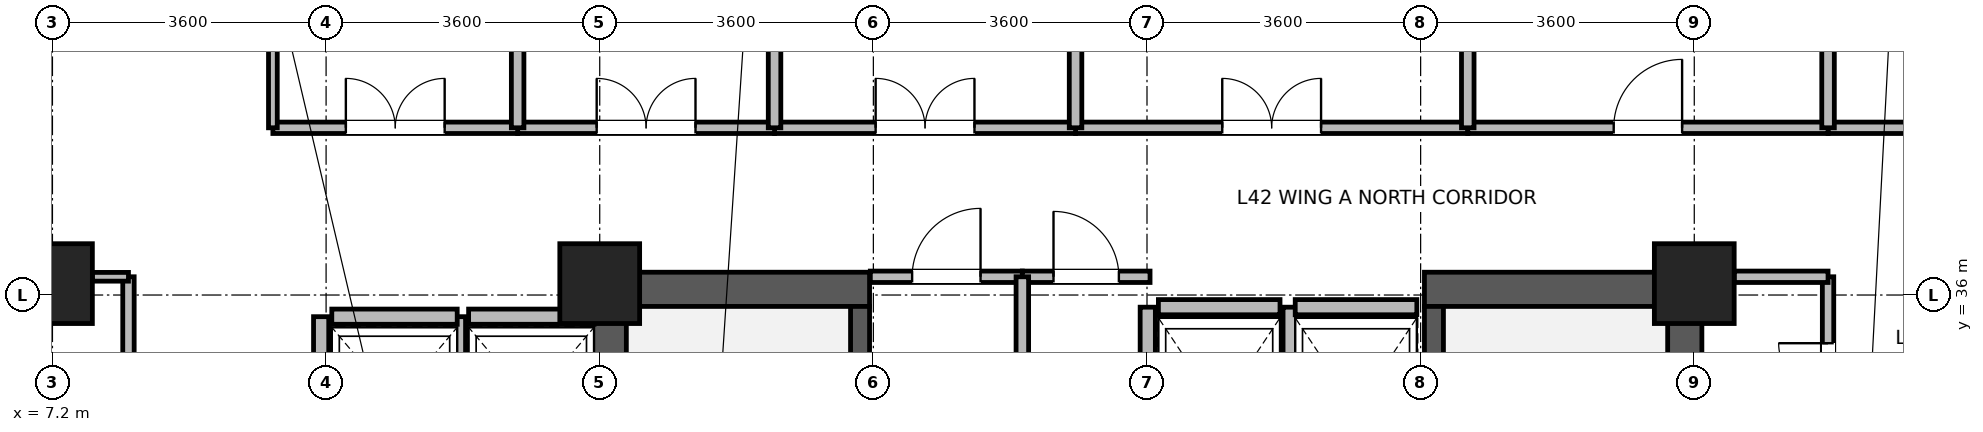
"""IFC4 building model, lengths in metres.
Left out: names, types, materials, properties, quantities, classifications, styles, units other than length and angle.
Written with IfcOpenShell. Run it as: python <this file> out.ifc"""

import sys

from ifc_helpers import new_model, si_unit, direction, frame, frame_2d, origin, origin_2d, place, context, subcontext, project, spatial, rectangle, extrude, source, transform, mapped, element, fill, save


model = new_model("IFC4")
c1 = context("Model", 3, precision=1e-05, world=origin(), true_north=direction((0.0, 1.0)))
c2 = subcontext(c1, "Body", "Model", "MODEL_VIEW")
j1 = project(units=[si_unit("LENGTHUNIT", "METRE"), si_unit("PLANEANGLEUNIT", "RADIAN")], contexts=[c1])
p1 = place(None, origin())
s1 = spatial("IfcSite", under=j1, at=p1, CompositionType="ELEMENT")
p2 = place(p1, origin())
s2 = spatial("IfcBuilding", under=s1, at=p2, CompositionType="ELEMENT")
p3 = place(p2, frame((0.0, 0.0, 166.1)))
s3 = spatial("IfcBuildingStorey", under=s2, at=p3, CompositionType="ELEMENT", Elevation=166.1)
for number, where, z_axis, x_axis in (
    (1, (14.525, 28.4, 0.0), (0.0, 0.0, 1.0), (0.0, 1.0, 0.0)),
    (2, (28.675, 28.4, 0.0), (0.0, 0.0, 1.0), (0.0, 1.0, 0.0)),
):
    element("IfcWall", number, at=place(p3, frame(where, z_axis=z_axis, x_axis=x_axis)), inside=s3, PredefinedType="SHEAR", context=c2, shape_type="SweptSolid", body=[
        extrude(rectangle(XDim=7.9, YDim=0.45, at=frame_2d((3.95, 0.0))), origin(), (0.0, 0.0, 1.0), 3.46),
    ])
for number, where, z_axis, x_axis in (
    (3, (14.75, 36.075, 0.0), (0.0, 0.0, 1.0), (1.0, 0.0, 0.0)),
    (4, (25.25, 36.075, 0.0), (0.0, 0.0, 1.0), (1.0, 0.0, 0.0)),
):
    element("IfcWall", number, at=place(p3, frame(where, z_axis=z_axis, x_axis=x_axis)), inside=s3, PredefinedType="SHEAR", context=c2, shape_type="SweptSolid", body=[
        extrude(rectangle(XDim=3.2, YDim=0.45, at=frame_2d((1.6, 0.0))), origin(), (0.0, 0.0, 1.0), 3.46),
    ])
p4 = place(p3, frame((17.825, 28.85, 0.0), z_axis=(0.0, 0.0, 1.0), x_axis=(0.0, 1.0, 0.0)))
e5 = element("IfcWall", 5, at=p4, inside=s3, PredefinedType="SHEAR", context=c2, shape_type="SweptSolid", body=[
    extrude(rectangle(XDim=7.0, YDim=0.25, at=frame_2d((3.5, 0.0))), origin(), (0.0, 0.0, 1.0), 3.46),
])
p5 = place(p4, frame((0.15, 0.0, 0.0)))
e6 = element("IfcOpeningElement", 6, at=p5, cuts=e5, PredefinedType="OPENING", context=c2, shape_type="SweptSolid", body=[
    extrude(rectangle(XDim=1.1, YDim=2.08, at=frame_2d((0.55, 1.04))), frame((0.0, 0.135, 0.0), z_axis=(0.0, -1.0, 0.0), x_axis=(1.0, 0.0, 0.0)), (0.0, 0.0, 1.0), 0.27),
])
p6 = place(p3, frame((25.375, 28.85, 0.0), z_axis=(0.0, 0.0, 1.0), x_axis=(0.0, 1.0, 0.0)))
e7 = element("IfcWall", 7, at=p6, inside=s3, PredefinedType="SHEAR", context=c2, shape_type="SweptSolid", body=[
    extrude(rectangle(XDim=7.0, YDim=0.25, at=frame_2d((3.5, 0.0))), origin(), (0.0, 0.0, 1.0), 3.46),
])
p7 = place(p6, frame((0.15, 0.0, 0.0)))
e8 = element("IfcOpeningElement", 8, at=p7, cuts=e7, PredefinedType="OPENING", context=c2, shape_type="SweptSolid", body=[
    extrude(rectangle(XDim=1.1, YDim=2.08, at=frame_2d((0.55, 1.04))), frame((0.0, 0.135, 0.0), z_axis=(0.0, -1.0, 0.0), x_axis=(1.0, 0.0, 0.0)), (0.0, 0.0, 1.0), 0.27),
])
m1 = source(origin(), c2, "Body", "SweptSolid", [
    extrude(rectangle(XDim=1.05, YDim=1.05, at=origin_2d()), origin(), (0.0, 0.0, 1.0), 3.7),
])
for number, where, z_axis, x_axis in (
    (9, (7.2, 36.15, 0.0), (0.0, 0.0, 1.0), (1.0, 0.0, 0.0)),
    (10, (14.4, 36.15, 0.0), (0.0, 0.0, 1.0), (1.0, 0.0, 0.0)),
    (11, (28.8, 36.15, 0.0), (0.0, 0.0, 1.0), (1.0, 0.0, 0.0)),
):
    element("IfcColumn", number, at=place(p3, frame(where, z_axis=z_axis, x_axis=x_axis)), inside=s3, PredefinedType="COLUMN", context=c2, shape_type="MappedRepresentation", body=[
        mapped(m1, transform((0.0, 0.0, 0.0), x_axis=(1.0, 0.0, 0.0), y_axis=(0.0, 1.0, 0.0), z_axis=(0.0, 0.0, 1.0), scale=1.0)),
    ])
p8 = place(p3, frame((12.675, 35.715, 0.0), z_axis=(0.0, 0.0, 1.0), x_axis=(1.0, 0.0, 0.0)))
e12 = element("IfcWall", 12, at=p8, inside=s3, PredefinedType="PARTITIONING", context=c2, shape_type="SweptSolid", body=[
    extrude(rectangle(XDim=1.65, YDim=0.2, at=frame_2d((0.825, 0.0))), origin(), (0.0, 0.0, 1.0), 3.44),
])
p9 = place(p3, frame((12.535, 33.485, 0.0), z_axis=(0.0, 0.0, 1.0), x_axis=(0.0, 1.0, 0.0)))
e13 = element("IfcWall", 13, at=p9, inside=s3, PredefinedType="PARTITIONING", context=c2, shape_type="SweptSolid", body=[
    extrude(rectangle(XDim=2.23, YDim=0.2, at=frame_2d((1.115, 0.0))), origin(), (0.0, 0.0, 1.0), 3.44),
])
p10 = place(p3, frame((10.875, 35.715, 0.0), z_axis=(0.0, 0.0, 1.0), x_axis=(1.0, 0.0, 0.0)))
e14 = element("IfcWall", 14, at=p10, inside=s3, PredefinedType="PARTITIONING", context=c2, shape_type="SweptSolid", body=[
    extrude(rectangle(XDim=1.65, YDim=0.2, at=frame_2d((0.825, 0.0))), origin(), (0.0, 0.0, 1.0), 3.44),
])
p11 = place(p3, frame((10.735, 33.485, 0.0), z_axis=(0.0, 0.0, 1.0), x_axis=(0.0, 1.0, 0.0)))
e15 = element("IfcWall", 15, at=p11, inside=s3, PredefinedType="PARTITIONING", context=c2, shape_type="SweptSolid", body=[
    extrude(rectangle(XDim=2.23, YDim=0.2, at=frame_2d((1.115, 0.0))), origin(), (0.0, 0.0, 1.0), 3.44),
])
p12 = place(p3, frame((21.75, 35.84, 0.0), z_axis=(0.0, 0.0, 1.0), x_axis=(1.0, 0.0, 0.0)))
e16 = element("IfcWall", 16, at=p12, inside=s3, PredefinedType="PARTITIONING", context=c2, shape_type="SweptSolid", body=[
    extrude(rectangle(XDim=1.6, YDim=0.2, at=frame_2d((0.8, 0.0))), origin(), (0.0, 0.0, 1.0), 2.44),
])
for number, where, z_axis, x_axis in (
    (17, (21.61, 33.16, 0.0), (0.0, 0.0, 1.0), (0.0, 1.0, 0.0)),
    (18, (23.49, 33.16, 0.0), (0.0, 0.0, 1.0), (0.0, 1.0, 0.0)),
):
    element("IfcWall", number, at=place(p3, frame(where, z_axis=z_axis, x_axis=x_axis)), inside=s3, PredefinedType="PARTITIONING", context=c2, shape_type="SweptSolid", body=[
        extrude(rectangle(XDim=2.68, YDim=0.2, at=frame_2d((1.34, 0.0))), origin(), (0.0, 0.0, 1.0), 3.44),
    ])
p13 = place(p3, frame((23.55, 35.84, 0.0), z_axis=(0.0, 0.0, 1.0), x_axis=(1.0, 0.0, 0.0)))
e19 = element("IfcWall", 19, at=p13, inside=s3, PredefinedType="PARTITIONING", context=c2, shape_type="SweptSolid", body=[
    extrude(rectangle(XDim=1.6, YDim=0.2, at=frame_2d((0.8, 0.0))), origin(), (0.0, 0.0, 1.0), 2.44),
])
p14 = place(p3, frame((20.66, 38.2, 0.0), z_axis=(0.0, 0.0, 1.0), x_axis=(1.0, 0.0, 0.0)))
e20 = element("IfcWall", 20, at=p14, inside=s3, PredefinedType="PARTITIONING", context=c2, shape_type="SweptSolid", body=[
    extrude(rectangle(XDim=5.16, YDim=0.15, at=frame_2d((2.58, 0.0))), origin(), (0.0, 0.0, 1.0), 3.44),
])
p15 = place(p14, frame((1.93, 0.0, 0.0)))
e21 = element("IfcOpeningElement", 21, at=p15, cuts=e20, PredefinedType="OPENING", context=c2, shape_type="SweptSolid", body=[
    extrude(rectangle(XDim=1.3, YDim=2.12, at=frame_2d((0.65, 1.06))), frame((0.0, 0.085, 0.0), z_axis=(0.0, -1.0, 0.0), x_axis=(1.0, 0.0, 0.0)), (0.0, 0.0, 1.0), 0.17),
])
p16 = place(p3, frame((30.56, 38.2, 0.0), z_axis=(0.0, 0.0, 1.0), x_axis=(1.0, 0.0, 0.0)))
e22 = element("IfcWall", 22, at=p16, inside=s3, PredefinedType="PARTITIONING", context=c2, shape_type="SweptSolid", body=[
    extrude(rectangle(XDim=4.8, YDim=0.15, at=frame_2d((2.4, 0.0))), origin(), (0.0, 0.0, 1.0), 3.44),
])
p17 = place(p16, frame((1.75, 0.0, 0.0)))
e23 = element("IfcOpeningElement", 23, at=p17, cuts=e22, PredefinedType="OPENING", context=c2, shape_type="SweptSolid", body=[
    extrude(rectangle(XDim=1.3, YDim=2.12, at=frame_2d((0.65, 1.06))), frame((0.0, 0.085, 0.0), z_axis=(0.0, -1.0, 0.0), x_axis=(1.0, 0.0, 0.0)), (0.0, 0.0, 1.0), 0.17),
])
p18 = place(p3, frame((25.82, 38.2, 0.0), z_axis=(0.0, 0.0, 1.0), x_axis=(1.0, 0.0, 0.0)))
e24 = element("IfcWall", 24, at=p18, inside=s3, PredefinedType="PARTITIONING", context=c2, shape_type="SweptSolid", body=[
    extrude(rectangle(XDim=4.74, YDim=0.15, at=frame_2d((2.37, 0.0))), origin(), (0.0, 0.0, 1.0), 3.44),
])
p19 = place(p18, frame((1.92, 0.0, 0.0)))
e25 = element("IfcOpeningElement", 25, at=p19, cuts=e24, PredefinedType="OPENING", context=c2, shape_type="SweptSolid", body=[
    extrude(rectangle(XDim=0.9, YDim=2.08, at=frame_2d((0.45, 1.04))), frame((0.0, 0.085, 0.0), z_axis=(0.0, -1.0, 0.0), x_axis=(1.0, 0.0, 0.0)), (0.0, 0.0, 1.0), 0.17),
])
p20 = place(p3, frame((16.7, 38.2, 0.0), z_axis=(0.0, 0.0, 1.0), x_axis=(1.0, 0.0, 0.0)))
e26 = element("IfcWall", 26, at=p20, inside=s3, PredefinedType="PARTITIONING", context=c2, shape_type="SweptSolid", body=[
    extrude(rectangle(XDim=3.96, YDim=0.15, at=frame_2d((1.98, 0.0))), origin(), (0.0, 0.0, 1.0), 3.44),
])
p21 = place(p20, frame((1.33, 0.0, 0.0)))
e27 = element("IfcOpeningElement", 27, at=p21, cuts=e26, PredefinedType="OPENING", context=c2, shape_type="SweptSolid", body=[
    extrude(rectangle(XDim=1.3, YDim=2.12, at=frame_2d((0.65, 1.06))), frame((0.0, 0.085, 0.0), z_axis=(0.0, -1.0, 0.0), x_axis=(1.0, 0.0, 0.0)), (0.0, 0.0, 1.0), 0.17),
])
p22 = place(p3, frame((8.2, 32.4, 0.0), z_axis=(0.0, 0.0, 1.0), x_axis=(0.0, 1.0, 0.0)))
e28 = element("IfcWall", 28, at=p22, inside=s3, PredefinedType="PARTITIONING", context=c2, shape_type="SweptSolid", body=[
    extrude(rectangle(XDim=3.84, YDim=0.15, at=frame_2d((1.92, 0.0))), origin(), (0.0, 0.0, 1.0), 3.44),
])
p23 = place(p22, frame((1.27, 0.0, 0.0)))
e29 = element("IfcOpeningElement", 29, at=p23, cuts=e28, PredefinedType="OPENING", context=c2, shape_type="SweptSolid", body=[
    extrude(rectangle(XDim=1.3, YDim=2.12, at=frame_2d((0.65, 1.06))), frame((0.0, 0.085, 0.0), z_axis=(0.0, -1.0, 0.0), x_axis=(1.0, 0.0, 0.0)), (0.0, 0.0, 1.0), 0.17),
])
p24 = place(p3, frame((13.32, 38.2, 0.0), z_axis=(0.0, 0.0, 1.0), x_axis=(1.0, 0.0, 0.0)))
e30 = element("IfcWall", 30, at=p24, inside=s3, PredefinedType="PARTITIONING", context=c2, shape_type="SweptSolid", body=[
    extrude(rectangle(XDim=3.38, YDim=0.15, at=frame_2d((1.69, 0.0))), origin(), (0.0, 0.0, 1.0), 3.44),
])
p25 = place(p24, frame((1.04, 0.0, 0.0)))
e31 = element("IfcOpeningElement", 31, at=p25, cuts=e30, PredefinedType="OPENING", context=c2, shape_type="SweptSolid", body=[
    extrude(rectangle(XDim=1.3, YDim=2.12, at=frame_2d((0.65, 1.06))), frame((0.0, 0.085, 0.0), z_axis=(0.0, -1.0, 0.0), x_axis=(1.0, 0.0, 0.0)), (0.0, 0.0, 1.0), 0.17),
])
p26 = place(p3, frame((10.1, 38.2, 0.0), z_axis=(0.0, 0.0, 1.0), x_axis=(1.0, 0.0, 0.0)))
e32 = element("IfcWall", 32, at=p26, inside=s3, PredefinedType="PARTITIONING", context=c2, shape_type="SweptSolid", body=[
    extrude(rectangle(XDim=3.22, YDim=0.15, at=frame_2d((1.61, 0.0))), origin(), (0.0, 0.0, 1.0), 3.44),
])
p27 = place(p26, frame((0.96, 0.0, 0.0)))
e33 = element("IfcOpeningElement", 33, at=p27, cuts=e32, PredefinedType="OPENING", context=c2, shape_type="SweptSolid", body=[
    extrude(rectangle(XDim=1.3, YDim=2.12, at=frame_2d((0.65, 1.06))), frame((0.0, 0.085, 0.0), z_axis=(0.0, -1.0, 0.0), x_axis=(1.0, 0.0, 0.0)), (0.0, 0.0, 1.0), 0.17),
])
p28 = place(p3, frame((30.56, 33.7, 0.0), z_axis=(0.0, 0.0, 1.0), x_axis=(0.0, 1.0, 0.0)))
e34 = element("IfcWall", 34, at=p28, inside=s3, PredefinedType="PARTITIONING", context=c2, shape_type="SweptSolid", body=[
    extrude(rectangle(XDim=2.54, YDim=0.15, at=frame_2d((1.27, 0.0))), origin(), (0.0, 0.0, 1.0), 3.44),
])
p29 = place(p28, frame((0.366, 0.0, 0.0)))
e35 = element("IfcOpeningElement", 35, at=p29, cuts=e34, PredefinedType="OPENING", context=c2, shape_type="SweptSolid", body=[
    extrude(rectangle(XDim=1.3, YDim=2.12, at=frame_2d((0.65, 1.06))), frame((0.0, 0.085, 0.0), z_axis=(0.0, -1.0, 0.0), x_axis=(1.0, 0.0, 0.0)), (0.0, 0.0, 1.0), 0.17),
])
p30 = place(p3, frame((17.96, 36.24, 0.0), z_axis=(0.0, 0.0, 1.0), x_axis=(1.0, 0.0, 0.0)))
e36 = element("IfcWall", 36, at=p30, inside=s3, PredefinedType="PARTITIONING", context=c2, shape_type="SweptSolid", body=[
    extrude(rectangle(XDim=2.0, YDim=0.15, at=frame_2d((1.0, 0.0))), origin(), (0.0, 0.0, 1.0), 2.44),
])
p31 = place(p30, frame((0.55, 0.0, 0.0)))
e37 = element("IfcOpeningElement", 37, at=p31, cuts=e36, PredefinedType="OPENING", context=c2, shape_type="SweptSolid", body=[
    extrude(rectangle(XDim=0.9, YDim=2.08, at=frame_2d((0.45, 1.04))), frame((0.0, 0.085, 0.0), z_axis=(0.0, -1.0, 0.0), x_axis=(1.0, 0.0, 0.0)), (0.0, 0.0, 1.0), 0.17),
])
p32 = place(p3, frame((29.325, 36.24, 0.0), z_axis=(0.0, 0.0, 1.0), x_axis=(1.0, 0.0, 0.0)))
e38 = element("IfcWall", 38, at=p32, inside=s3, PredefinedType="PARTITIONING", context=c2, shape_type="SweptSolid", body=[
    extrude(rectangle(XDim=1.235, YDim=0.15, at=frame_2d((0.618, 0.0))), origin(), (0.0, 0.0, 1.0), 2.84),
])
p33 = place(p3, frame((19.96, 36.24, 0.0), z_axis=(0.0, 0.0, 1.0), x_axis=(1.0, 0.0, 0.0)))
e39 = element("IfcWall", 39, at=p33, inside=s3, PredefinedType="PARTITIONING", context=c2, shape_type="SweptSolid", body=[
    extrude(rectangle(XDim=1.68, YDim=0.15, at=frame_2d((0.84, 0.0))), origin(), (0.0, 0.0, 1.0), 2.44),
])
p34 = place(p33, frame((0.41, 0.0, 0.0)))
e40 = element("IfcOpeningElement", 40, at=p34, cuts=e39, PredefinedType="OPENING", context=c2, shape_type="SweptSolid", body=[
    extrude(rectangle(XDim=0.86, YDim=2.02, at=frame_2d((0.43, 1.01))), frame((0.0, 0.085, 0.0), z_axis=(0.0, -1.0, 0.0), x_axis=(1.0, 0.0, 0.0)), (0.0, 0.0, 1.0), 0.17),
])
p35 = place(p3, frame((7.725, 36.24, 0.0), z_axis=(0.0, 0.0, 1.0), x_axis=(1.0, 0.0, 0.0)))
e41 = element("IfcWall", 41, at=p35, inside=s3, PredefinedType="PARTITIONING", context=c2, shape_type="SweptSolid", body=[
    extrude(rectangle(XDim=0.475, YDim=0.115, at=frame_2d((0.237, 0.0))), origin(), (0.0, 0.0, 1.0), 2.84),
])
p36 = place(p3, frame((10.1, 38.2, 0.0), z_axis=(0.0, 0.0, 1.0), x_axis=(0.0, 1.0, 0.0)))
e42 = element("IfcWall", 42, at=p36, inside=s3, PredefinedType="PARTITIONING", context=c2, shape_type="SweptSolid", body=[
    extrude(rectangle(XDim=1.268, YDim=0.115, at=frame_2d((0.634, 0.0))), origin(), (0.0, 0.0, 1.0), 3.44),
])
for number, where, z_axis, x_axis in (
    (43, (13.32, 38.2, 0.0), (0.0, 0.0, 1.0), (0.0, 1.0, 0.0)),
    (44, (16.7, 38.2, 0.0), (0.0, 0.0, 1.0), (0.0, 1.0, 0.0)),
    (45, (20.66, 38.2, 0.0), (0.0, 0.0, 1.0), (0.0, 1.0, 0.0)),
    (46, (25.82, 38.2, 0.0), (0.0, 0.0, 1.0), (0.0, 1.0, 0.0)),
    (47, (30.56, 38.2, 0.0), (0.0, 0.0, 1.0), (0.0, 1.0, 0.0)),
):
    element("IfcWall", number, at=place(p3, frame(where, z_axis=z_axis, x_axis=x_axis)), inside=s3, PredefinedType="PARTITIONING", context=c2, shape_type="SweptSolid", body=[
        extrude(rectangle(XDim=4.868, YDim=0.165, at=frame_2d((2.434, 0.0))), origin(), (0.0, 0.0, 1.0), 3.44),
    ])
p37 = place(p3, frame((19.96, 33.36, 0.0), z_axis=(0.0, 0.0, 1.0), x_axis=(0.0, 1.0, 0.0)))
e48 = element("IfcWall", 48, at=p37, inside=s3, PredefinedType="PARTITIONING", context=c2, shape_type="SweptSolid", body=[
    extrude(rectangle(XDim=2.88, YDim=0.165, at=frame_2d((1.44, 0.0))), origin(), (0.0, 0.0, 1.0), 3.44),
])
p38 = place(p15, origin())
e49 = element("IfcDoor", 49, at=p38, inside=s3, OperationType="DOUBLE_DOOR_SINGLE_SWING", PredefinedType="DOOR", context=c2, shape_type="SweptSolid", body=[
    extrude(rectangle(XDim=1.3, YDim=2.12, at=frame_2d((0.65, 1.06))), frame((0.0, 0.025, 0.0), z_axis=(0.0, -1.0, 0.0), x_axis=(1.0, 0.0, 0.0)), (0.0, 0.0, 1.0), 0.05),
])
fill(e21, e49)
p39 = place(p19, origin())
e50 = element("IfcDoor", 50, at=p39, inside=s3, OperationType="SINGLE_SWING_RIGHT", PredefinedType="DOOR", context=c2, shape_type="SweptSolid", body=[
    extrude(rectangle(XDim=0.9, YDim=2.08, at=frame_2d((0.45, 1.04))), frame((0.0, 0.025, 0.0), z_axis=(0.0, -1.0, 0.0), x_axis=(1.0, 0.0, 0.0)), (0.0, 0.0, 1.0), 0.05),
])
fill(e25, e50)
p40 = place(p21, origin())
e51 = element("IfcDoor", 51, at=p40, inside=s3, OperationType="DOUBLE_DOOR_SINGLE_SWING", PredefinedType="DOOR", context=c2, shape_type="SweptSolid", body=[
    extrude(rectangle(XDim=1.3, YDim=2.12, at=frame_2d((0.65, 1.06))), frame((0.0, 0.025, 0.0), z_axis=(0.0, -1.0, 0.0), x_axis=(1.0, 0.0, 0.0)), (0.0, 0.0, 1.0), 0.05),
])
fill(e27, e51)
p41 = place(p25, origin())
e52 = element("IfcDoor", 52, at=p41, inside=s3, OperationType="DOUBLE_DOOR_SINGLE_SWING", PredefinedType="DOOR", context=c2, shape_type="SweptSolid", body=[
    extrude(rectangle(XDim=1.3, YDim=2.12, at=frame_2d((0.65, 1.06))), frame((0.0, 0.025, 0.0), z_axis=(0.0, -1.0, 0.0), x_axis=(1.0, 0.0, 0.0)), (0.0, 0.0, 1.0), 0.05),
])
fill(e31, e52)
p42 = place(p27, origin())
e53 = element("IfcDoor", 53, at=p42, inside=s3, OperationType="DOUBLE_DOOR_SINGLE_SWING", PredefinedType="DOOR", context=c2, shape_type="SweptSolid", body=[
    extrude(rectangle(XDim=1.3, YDim=2.12, at=frame_2d((0.65, 1.06))), frame((0.0, 0.025, 0.0), z_axis=(0.0, -1.0, 0.0), x_axis=(1.0, 0.0, 0.0)), (0.0, 0.0, 1.0), 0.05),
])
fill(e33, e53)
p43 = place(p29, origin())
e54 = element("IfcDoor", 54, at=p43, inside=s3, OperationType="DOUBLE_DOOR_SINGLE_SWING", PredefinedType="DOOR", context=c2, shape_type="SweptSolid", body=[
    extrude(rectangle(XDim=1.3, YDim=2.12, at=frame_2d((0.65, 1.06))), frame((0.0, 0.025, 0.0), z_axis=(0.0, -1.0, 0.0), x_axis=(1.0, 0.0, 0.0)), (0.0, 0.0, 1.0), 0.05),
])
fill(e35, e54)
p44 = place(p31, origin())
e55 = element("IfcDoor", 55, at=p44, inside=s3, OperationType="SINGLE_SWING_RIGHT", PredefinedType="DOOR", context=c2, shape_type="SweptSolid", body=[
    extrude(rectangle(XDim=0.9, YDim=2.08, at=frame_2d((0.45, 1.04))), frame((0.0, 0.025, 0.0), z_axis=(0.0, -1.0, 0.0), x_axis=(1.0, 0.0, 0.0)), (0.0, 0.0, 1.0), 0.05),
])
fill(e37, e55)
p45 = place(p34, origin())
e56 = element("IfcDoor", 56, at=p45, inside=s3, OperationType="SINGLE_SWING_LEFT", PredefinedType="DOOR", context=c2, shape_type="SweptSolid", body=[
    extrude(rectangle(XDim=0.86, YDim=2.02, at=frame_2d((0.43, 1.01))), frame((0.0, 0.025, 0.0), z_axis=(0.0, -1.0, 0.0), x_axis=(1.0, 0.0, 0.0)), (0.0, 0.0, 1.0), 0.05),
])
fill(e40, e56)
save(model, sys.argv[1])
